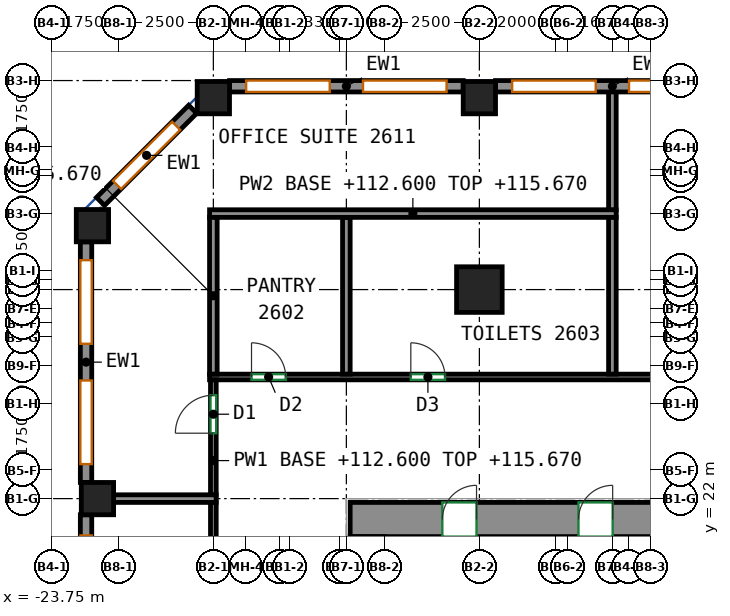
"""IFC4 building model, lengths in metres.
Left out: names, types, materials, properties, quantities, classifications, styles, units other than length and angle.
Written with IfcOpenShell. Run it as: python <this file> out.ifc"""

import sys

from ifc_helpers import new_model, si_unit, direction, frame, frame_2d, origin, origin_2d, place, context, subcontext, project, spatial, rectangle, extrude, source, transform, mapped, element, fill, save


model = new_model("IFC4")
c1 = context("Model", 3, precision=1e-05, world=origin(), true_north=direction((0.0, 1.0)))
c2 = subcontext(c1, "Body", "Model", "MODEL_VIEW")
j1 = project(units=[si_unit("LENGTHUNIT", "METRE"), si_unit("PLANEANGLEUNIT", "RADIAN")], contexts=[c1])
p1 = place(None, origin())
s1 = spatial("IfcSite", under=j1, at=p1, CompositionType="ELEMENT")
p2 = place(p1, origin())
s2 = spatial("IfcBuilding", under=s1, at=p2, CompositionType="ELEMENT")
p3 = place(p2, frame((0.0, 0.0, 112.6)))
s3 = spatial("IfcBuildingStorey", under=s2, at=p3, CompositionType="ELEMENT", Elevation=112.6)
m1 = source(origin(), c2, "Body", "SweptSolid", [
    extrude(rectangle(XDim=0.85, YDim=0.85, at=origin_2d()), origin(), (0.0, 0.0, 1.0), 3.72),
])
for number, where, z_axis, x_axis in (
    (1, (-22.682, 29.182, 0.0), (0.0, 0.0, 1.0), (1.0, 0.0, 0.0)),
    (2, (-22.55, 22.0, 0.0), (0.0, 0.0, 1.0), (1.0, 0.0, 0.0)),
    (3, (-19.5, 32.55, 0.0), (0.0, 0.0, 1.0), (1.0, 0.0, 0.0)),
):
    element("IfcColumn", number, at=place(p3, frame(where, z_axis=z_axis, x_axis=x_axis)), inside=s3, PredefinedType="COLUMN", context=c2, shape_type="MappedRepresentation", body=[
        mapped(m1, transform((0.0, 0.0, 0.0))),
    ])
m2 = source(origin(), c2, "Body", "SweptSolid", [
    extrude(rectangle(XDim=1.2, YDim=1.2, at=origin_2d()), origin(), (0.0, 0.0, 1.0), 3.72),
])
p4 = place(p3, frame((-12.5, 27.5, 0.0), z_axis=(0.0, 0.0, 1.0), x_axis=(1.0, 0.0, 0.0)))
e4 = element("IfcColumn", 4, at=p4, inside=s3, PredefinedType="COLUMN", context=c2, shape_type="MappedRepresentation", body=[
    mapped(m2, transform((0.0, 0.0, 0.0))),
])
p5 = place(p3, frame((-12.5, 32.55, 0.0), z_axis=(0.0, 0.0, 1.0), x_axis=(1.0, 0.0, 0.0)))
e5 = element("IfcColumn", 5, at=p5, inside=s3, PredefinedType="COLUMN", context=c2, shape_type="MappedRepresentation", body=[
    mapped(m1, transform((0.0, 0.0, 0.0))),
])
m3 = source(origin(), c2, "Body", "SweptSolid", [
    extrude(rectangle(XDim=33.9, YDim=0.9, at=frame_2d((16.95, 0.0))), origin(), (0.0, 0.0, 1.0), 3.72),
])
p6 = place(p3, frame((-15.9, 21.45, 0.0), z_axis=(0.0, 0.0, 1.0), x_axis=(1.0, 0.0, 0.0)))
e6 = element("IfcWall", 6, at=p6, inside=s3, PredefinedType="SHEAR", context=c2, shape_type="MappedRepresentation", body=[
    mapped(m3, transform((0.0, 0.0, 0.0))),
])
p7 = place(p6, frame((6.008, 0.0, 0.0)))
e7 = element("IfcOpeningElement", 7, at=p7, cuts=e6, PredefinedType="OPENING", context=c2, shape_type="SweptSolid", body=[
    extrude(rectangle(XDim=0.9, YDim=2.1, at=frame_2d((0.45, 1.05))), frame((0.0, 0.46, 0.0), z_axis=(0.0, -1.0, 0.0), x_axis=(1.0, 0.0, 0.0)), (0.0, 0.0, 1.0), 0.92),
])
p8 = place(p6, frame((8.688, 0.0, 0.0)))
e8 = element("IfcOpeningElement", 8, at=p8, cuts=e6, PredefinedType="OPENING", context=c2, shape_type="SweptSolid", body=[
    extrude(rectangle(XDim=0.9, YDim=2.1, at=frame_2d((0.45, 1.05))), frame((0.0, 0.46, 0.0), z_axis=(0.0, -1.0, 0.0), x_axis=(1.0, 0.0, 0.0)), (0.0, 0.0, 1.0), 0.92),
])
p9 = place(p6, frame((12.185, 0.0, 0.0)))
e9 = element("IfcOpeningElement", 9, at=p9, cuts=e6, PredefinedType="OPENING", context=c2, shape_type="SweptSolid", body=[
    extrude(rectangle(XDim=0.9, YDim=2.1, at=frame_2d((0.45, 1.05))), frame((0.0, 0.46, 0.0), z_axis=(0.0, -1.0, 0.0), x_axis=(1.0, 0.0, 0.0)), (0.0, 0.0, 1.0), 0.92),
])
p10 = place(p6, frame((16.138, 0.0, 0.0)))
e10 = element("IfcOpeningElement", 10, at=p10, cuts=e6, PredefinedType="OPENING", context=c2, shape_type="SweptSolid", body=[
    extrude(rectangle(XDim=0.9, YDim=2.1, at=frame_2d((0.45, 1.05))), frame((0.0, 0.46, 0.0), z_axis=(0.0, -1.0, 0.0), x_axis=(1.0, 0.0, 0.0)), (0.0, 0.0, 1.0), 0.92),
])
p11 = place(p6, frame((20.962, 0.0, 0.0)))
e11 = element("IfcOpeningElement", 11, at=p11, cuts=e6, PredefinedType="OPENING", context=c2, shape_type="SweptSolid", body=[
    extrude(rectangle(XDim=0.9, YDim=2.1, at=frame_2d((0.45, 1.05))), frame((0.0, 0.46, 0.0), z_axis=(0.0, -1.0, 0.0), x_axis=(1.0, 0.0, 0.0)), (0.0, 0.0, 1.0), 0.92),
])
p12 = place(p6, frame((26.389, 0.0, 0.0)))
e12 = element("IfcOpeningElement", 12, at=p12, cuts=e6, PredefinedType="OPENING", context=c2, shape_type="SweptSolid", body=[
    extrude(rectangle(XDim=0.9, YDim=2.1, at=frame_2d((0.45, 1.05))), frame((0.0, 0.46, 0.0), z_axis=(0.0, -1.0, 0.0), x_axis=(1.0, 0.0, 0.0)), (0.0, 0.0, 1.0), 0.92),
])
p13 = place(p6, frame((2.425, 0.0, 0.0)))
e13 = element("IfcOpeningElement", 13, at=p13, cuts=e6, PredefinedType="OPENING", context=c2, shape_type="SweptSolid", body=[
    extrude(rectangle(XDim=0.9, YDim=2.1, at=frame_2d((0.45, 1.05))), frame((0.0, 0.46, 0.0), z_axis=(0.0, -1.0, 0.0), x_axis=(1.0, 0.0, 0.0)), (0.0, 0.0, 1.0), 0.92),
])
p14 = place(p6, frame((30.575, 0.0, 0.0)))
e14 = element("IfcOpeningElement", 14, at=p14, cuts=e6, PredefinedType="OPENING", context=c2, shape_type="SweptSolid", body=[
    extrude(rectangle(XDim=0.9, YDim=2.1, at=frame_2d((0.45, 1.05))), frame((0.0, 0.46, 0.0), z_axis=(0.0, -1.0, 0.0), x_axis=(1.0, 0.0, 0.0)), (0.0, 0.0, 1.0), 0.92),
])
m4 = source(origin(), c2, "Body", "SweptSolid", [
    extrude(rectangle(XDim=6.15, YDim=0.3, at=frame_2d((3.075, 0.0))), origin(), (0.0, 0.0, 1.0), 3.72),
])
p15 = place(p3, frame((-5.925, 32.85, 0.0), z_axis=(0.0, 0.0, 1.0), x_axis=(-1.0, 0.0, 0.0)))
e15 = element("IfcWall", 15, at=p15, inside=s3, PredefinedType="SOLIDWALL", context=c2, shape_type="MappedRepresentation", body=[
    mapped(m4, transform((0.0, 0.0, 0.0))),
])
p16 = place(p15, frame((0.438, 0.0, 0.7)))
e16 = element("IfcOpeningElement", 16, at=p16, cuts=e15, PredefinedType="OPENING", context=c2, shape_type="SweptSolid", body=[
    extrude(rectangle(XDim=2.2, YDim=2.25, at=frame_2d((1.1, 1.125))), frame((0.0, 0.16, 0.0), z_axis=(0.0, -1.0, 0.0), x_axis=(1.0, 0.0, 0.0)), (0.0, 0.0, 1.0), 0.32),
])
p17 = place(p15, frame((3.512, 0.0, 0.7)))
e17 = element("IfcOpeningElement", 17, at=p17, cuts=e15, PredefinedType="OPENING", context=c2, shape_type="SweptSolid", body=[
    extrude(rectangle(XDim=2.2, YDim=2.25, at=frame_2d((1.1, 1.125))), frame((0.0, 0.16, 0.0), z_axis=(0.0, -1.0, 0.0), x_axis=(1.0, 0.0, 0.0)), (0.0, 0.0, 1.0), 0.32),
])
p18 = place(p3, frame((-12.925, 32.85, 0.0), z_axis=(0.0, 0.0, 1.0), x_axis=(-1.0, 0.0, 0.0)))
e18 = element("IfcWall", 18, at=p18, inside=s3, PredefinedType="SOLIDWALL", context=c2, shape_type="MappedRepresentation", body=[
    mapped(m4, transform((0.0, 0.0, 0.0))),
])
p19 = place(p18, frame((0.438, 0.0, 0.7)))
e19 = element("IfcOpeningElement", 19, at=p19, cuts=e18, PredefinedType="OPENING", context=c2, shape_type="SweptSolid", body=[
    extrude(rectangle(XDim=2.2, YDim=2.25, at=frame_2d((1.1, 1.125))), frame((0.0, 0.16, 0.0), z_axis=(0.0, -1.0, 0.0), x_axis=(1.0, 0.0, 0.0)), (0.0, 0.0, 1.0), 0.32),
])
p20 = place(p18, frame((3.512, 0.0, 0.7)))
e20 = element("IfcOpeningElement", 20, at=p20, cuts=e18, PredefinedType="OPENING", context=c2, shape_type="SweptSolid", body=[
    extrude(rectangle(XDim=2.2, YDim=2.25, at=frame_2d((1.1, 1.125))), frame((0.0, 0.16, 0.0), z_axis=(0.0, -1.0, 0.0), x_axis=(1.0, 0.0, 0.0)), (0.0, 0.0, 1.0), 0.32),
])
m5 = source(origin(), c2, "Body", "SweptSolid", [
    extrude(rectangle(XDim=3.429, YDim=0.3, at=frame_2d((1.715, 0.0))), origin(), (0.0, 0.0, 1.0), 3.72),
])
p21 = place(p3, frame((-20.044, 32.244, 0.0), z_axis=(0.0, 0.0, 1.0), x_axis=(-0.707106781187, -0.707106781187, 0.0)))
e21 = element("IfcWall", 21, at=p21, inside=s3, PredefinedType="SOLIDWALL", context=c2, shape_type="MappedRepresentation", body=[
    mapped(m5, transform((0.0, 0.0, 0.0))),
])
p22 = place(p21, frame((0.615, 0.0, 0.7)))
e22 = element("IfcOpeningElement", 22, at=p22, cuts=e21, PredefinedType="OPENING", context=c2, shape_type="SweptSolid", body=[
    extrude(rectangle(XDim=2.2, YDim=2.25, at=frame_2d((1.1, 1.125))), frame((0.0, 0.16, 0.0), z_axis=(0.0, -1.0, 0.0), x_axis=(1.0, 0.0, 0.0)), (0.0, 0.0, 1.0), 0.32),
])
m6 = source(origin(), c2, "Body", "SweptSolid", [
    extrude(rectangle(XDim=6.332, YDim=0.3, at=frame_2d((3.166, 0.0))), origin(), (0.0, 0.0, 1.0), 3.72),
])
p23 = place(p3, frame((-22.85, 28.757, 0.0), z_axis=(0.0, 0.0, 1.0), x_axis=(0.0, -1.0, 0.0)))
e23 = element("IfcWall", 23, at=p23, inside=s3, PredefinedType="SOLIDWALL", context=c2, shape_type="MappedRepresentation", body=[
    mapped(m6, transform((0.0, 0.0, 0.0))),
])
p24 = place(p23, frame((0.483, 0.0, 0.7)))
e24 = element("IfcOpeningElement", 24, at=p24, cuts=e23, PredefinedType="OPENING", context=c2, shape_type="SweptSolid", body=[
    extrude(rectangle(XDim=2.2, YDim=2.25, at=frame_2d((1.1, 1.125))), frame((0.0, 0.16, 0.0), z_axis=(0.0, -1.0, 0.0), x_axis=(1.0, 0.0, 0.0)), (0.0, 0.0, 1.0), 0.32),
])
p25 = place(p23, frame((3.649, 0.0, 0.7)))
e25 = element("IfcOpeningElement", 25, at=p25, cuts=e23, PredefinedType="OPENING", context=c2, shape_type="SweptSolid", body=[
    extrude(rectangle(XDim=2.2, YDim=2.25, at=frame_2d((1.1, 1.125))), frame((0.0, 0.16, 0.0), z_axis=(0.0, -1.0, 0.0), x_axis=(1.0, 0.0, 0.0)), (0.0, 0.0, 1.0), 0.32),
])
m7 = source(origin(), c2, "Body", "SweptSolid", [
    extrude(rectangle(XDim=13.15, YDim=0.3, at=frame_2d((6.575, 0.0))), origin(), (0.0, 0.0, 1.0), 3.72),
])
p26 = place(p3, frame((-22.85, 21.575, 0.0), z_axis=(0.0, 0.0, 1.0), x_axis=(0.0, -1.0, 0.0)))
e26 = element("IfcWall", 26, at=p26, inside=s3, PredefinedType="SOLIDWALL", context=c2, shape_type="MappedRepresentation", body=[
    mapped(m7, transform((0.0, 0.0, 0.0))),
])
p27 = place(p26, frame((0.544, 0.0, 0.7)))
e27 = element("IfcOpeningElement", 27, at=p27, cuts=e26, PredefinedType="OPENING", context=c2, shape_type="SweptSolid", body=[
    extrude(rectangle(XDim=2.2, YDim=2.25, at=frame_2d((1.1, 1.125))), frame((0.0, 0.16, 0.0), z_axis=(0.0, -1.0, 0.0), x_axis=(1.0, 0.0, 0.0)), (0.0, 0.0, 1.0), 0.32),
])
p28 = place(p26, frame((3.831, 0.0, 0.7)))
e28 = element("IfcOpeningElement", 28, at=p28, cuts=e26, PredefinedType="OPENING", context=c2, shape_type="SweptSolid", body=[
    extrude(rectangle(XDim=2.2, YDim=2.25, at=frame_2d((1.1, 1.125))), frame((0.0, 0.16, 0.0), z_axis=(0.0, -1.0, 0.0), x_axis=(1.0, 0.0, 0.0)), (0.0, 0.0, 1.0), 0.32),
])
p29 = place(p26, frame((7.119, 0.0, 0.7)))
e29 = element("IfcOpeningElement", 29, at=p29, cuts=e26, PredefinedType="OPENING", context=c2, shape_type="SweptSolid", body=[
    extrude(rectangle(XDim=2.2, YDim=2.25, at=frame_2d((1.1, 1.125))), frame((0.0, 0.16, 0.0), z_axis=(0.0, -1.0, 0.0), x_axis=(1.0, 0.0, 0.0)), (0.0, 0.0, 1.0), 0.32),
])
p30 = place(p26, frame((10.406, 0.0, 0.7)))
e30 = element("IfcOpeningElement", 30, at=p30, cuts=e26, PredefinedType="OPENING", context=c2, shape_type="SweptSolid", body=[
    extrude(rectangle(XDim=2.2, YDim=2.25, at=frame_2d((1.1, 1.125))), frame((0.0, 0.16, 0.0), z_axis=(0.0, -1.0, 0.0), x_axis=(1.0, 0.0, 0.0)), (0.0, 0.0, 1.0), 0.32),
])
p31 = place(p3, frame((-19.6, 25.2, 0.0), z_axis=(0.0, 0.0, 1.0), x_axis=(1.0, 0.0, 0.0)))
e31 = element("IfcWall", 31, at=p31, inside=s3, PredefinedType="PARTITIONING", context=c2, shape_type="SweptSolid", body=[
    extrude(rectangle(XDim=40.175, YDim=0.15, at=frame_2d((20.087, 0.0))), origin(), (0.0, 0.0, 1.0), 3.72),
])
p32 = place(p31, frame((1.104, 0.0, 0.0)))
e32 = element("IfcOpeningElement", 32, at=p32, cuts=e31, PredefinedType="OPENING", context=c2, shape_type="SweptSolid", body=[
    extrude(rectangle(XDim=0.9, YDim=2.1, at=frame_2d((0.45, 1.05))), frame((0.0, 0.085, 0.0), z_axis=(0.0, -1.0, 0.0), x_axis=(1.0, 0.0, 0.0)), (0.0, 0.0, 1.0), 0.17),
])
p33 = place(p31, frame((5.296, 0.0, 0.0)))
e33 = element("IfcOpeningElement", 33, at=p33, cuts=e31, PredefinedType="OPENING", context=c2, shape_type="SweptSolid", body=[
    extrude(rectangle(XDim=0.9, YDim=2.1, at=frame_2d((0.45, 1.05))), frame((0.0, 0.085, 0.0), z_axis=(0.0, -1.0, 0.0), x_axis=(1.0, 0.0, 0.0)), (0.0, 0.0, 1.0), 0.17),
])
p34 = place(p31, frame((18.302, 0.0, 0.0)))
e34 = element("IfcOpeningElement", 34, at=p34, cuts=e31, PredefinedType="OPENING", context=c2, shape_type="SweptSolid", body=[
    extrude(rectangle(XDim=1.0, YDim=2.1, at=frame_2d((0.5, 1.05))), frame((0.0, 0.085, 0.0), z_axis=(0.0, -1.0, 0.0), x_axis=(1.0, 0.0, 0.0)), (0.0, 0.0, 1.0), 0.17),
])
p35 = place(p31, frame((30.209, 0.0, 0.0)))
e35 = element("IfcOpeningElement", 35, at=p35, cuts=e31, PredefinedType="OPENING", context=c2, shape_type="SweptSolid", body=[
    extrude(rectangle(XDim=0.9, YDim=2.1, at=frame_2d((0.45, 1.05))), frame((0.0, 0.085, 0.0), z_axis=(0.0, -1.0, 0.0), x_axis=(1.0, 0.0, 0.0)), (0.0, 0.0, 1.0), 0.17),
])
p36 = place(p31, frame((32.702, 0.0, 0.0)))
e36 = element("IfcOpeningElement", 36, at=p36, cuts=e31, PredefinedType="OPENING", context=c2, shape_type="SweptSolid", body=[
    extrude(rectangle(XDim=1.8, YDim=2.1, at=frame_2d((0.9, 1.05))), frame((0.0, 0.085, 0.0), z_axis=(0.0, -1.0, 0.0), x_axis=(1.0, 0.0, 0.0)), (0.0, 0.0, 1.0), 0.17),
])
p37 = place(p3, frame((-19.5, 22.09, 0.0), z_axis=(0.0, 0.0, 1.0), x_axis=(0.0, 1.0, 0.0)))
e37 = element("IfcWall", 37, at=p37, inside=s3, PredefinedType="PARTITIONING", context=c2, shape_type="SweptSolid", body=[
    extrude(rectangle(XDim=3.035, YDim=0.15, at=frame_2d((1.518, 0.0))), origin(), (0.0, 0.0, 1.0), 3.07),
])
p38 = place(p37, frame((1.631, 0.0, 0.0)))
e38 = element("IfcOpeningElement", 38, at=p38, cuts=e37, PredefinedType="OPENING", context=c2, shape_type="SweptSolid", body=[
    extrude(rectangle(XDim=1.0, YDim=2.1, at=frame_2d((0.5, 1.05))), frame((0.0, 0.085, 0.0), z_axis=(0.0, -1.0, 0.0), x_axis=(1.0, 0.0, 0.0)), (0.0, 0.0, 1.0), 0.17),
])
p39 = place(p3, frame((-19.5, 8.09, 0.0), z_axis=(0.0, 0.0, 1.0), x_axis=(0.0, 1.0, 0.0)))
e39 = element("IfcWall", 39, at=p39, inside=s3, PredefinedType="PARTITIONING", context=c2, shape_type="SweptSolid", body=[
    extrude(rectangle(XDim=13.82, YDim=0.15, at=frame_2d((6.91, 0.0))), origin(), (0.0, 0.0, 1.0), 3.07),
])
p40 = place(p39, frame((9.214, 0.0, 0.0)))
e40 = element("IfcOpeningElement", 40, at=p40, cuts=e39, PredefinedType="OPENING", context=c2, shape_type="SweptSolid", body=[
    extrude(rectangle(XDim=0.9, YDim=2.1, at=frame_2d((0.45, 1.05))), frame((0.0, 0.085, 0.0), z_axis=(0.0, -1.0, 0.0), x_axis=(1.0, 0.0, 0.0)), (0.0, 0.0, 1.0), 0.17),
])
p41 = place(p3, frame((-9.0, 25.276, 0.0), z_axis=(0.0, 0.0, 1.0), x_axis=(0.0, 1.0, 0.0)))
e41 = element("IfcWall", 41, at=p41, inside=s3, PredefinedType="PARTITIONING", context=c2, shape_type="SweptSolid", body=[
    extrude(rectangle(XDim=4.134, YDim=0.2, at=frame_2d((2.067, 0.0))), origin(), (0.0, 0.0, 1.0), 3.72),
])
p42 = place(p3, frame((-9.0, 29.59, 0.0), z_axis=(0.0, 0.0, 1.0), x_axis=(0.0, 1.0, 0.0)))
e42 = element("IfcWall", 42, at=p42, inside=s3, PredefinedType="PARTITIONING", context=c2, shape_type="SweptSolid", body=[
    extrude(rectangle(XDim=3.16, YDim=0.2, at=frame_2d((1.58, 0.0))), origin(), (0.0, 0.0, 1.0), 3.72),
])
p43 = place(p3, frame((-16.0, 29.4, 0.0), z_axis=(0.0, 0.0, 1.0), x_axis=(0.0, -1.0, 0.0)))
e43 = element("IfcWall", 43, at=p43, inside=s3, PredefinedType="PARTITIONING", context=c2, shape_type="SweptSolid", body=[
    extrude(rectangle(XDim=4.124, YDim=0.2, at=frame_2d((2.062, 0.0))), origin(), (0.0, 0.0, 1.0), 3.72),
])
p44 = place(p3, frame((-19.6, 29.5, 0.0), z_axis=(0.0, 0.0, 1.0), x_axis=(1.0, 0.0, 0.0)))
e44 = element("IfcWall", 44, at=p44, inside=s3, PredefinedType="PARTITIONING", context=c2, shape_type="SweptSolid", body=[
    extrude(rectangle(XDim=10.7, YDim=0.2, at=frame_2d((5.35, 0.0))), origin(), (0.0, 0.0, 1.0), 3.07),
])
p45 = place(p3, frame((-19.5, 29.4, 0.0), z_axis=(0.0, 0.0, 1.0), x_axis=(0.0, -1.0, 0.0)))
e45 = element("IfcWall", 45, at=p45, inside=s3, PredefinedType="PARTITIONING", context=c2, shape_type="SweptSolid", body=[
    extrude(rectangle(XDim=4.124, YDim=0.2, at=frame_2d((2.062, 0.0))), origin(), (0.0, 0.0, 1.0), 3.07),
])
p46 = place(p3, frame((-22.125, 22.0, 0.0), z_axis=(0.0, 0.0, 1.0), x_axis=(1.0, 0.0, 0.0)))
e46 = element("IfcWall", 46, at=p46, inside=s3, PredefinedType="PARTITIONING", context=c2, shape_type="SweptSolid", body=[
    extrude(rectangle(XDim=2.699, YDim=0.2, at=frame_2d((1.35, 0.0))), origin(), (0.0, 0.0, 1.0), 3.72),
])
p47 = place(p16, origin())
e47 = element("IfcWindow", 47, at=p47, inside=s3, PartitioningType="SINGLE_PANEL", PredefinedType="WINDOW", context=c2, shape_type="SweptSolid", body=[
    extrude(rectangle(XDim=2.2, YDim=2.25, at=frame_2d((1.1, 1.125))), frame((0.0, 0.03, 0.0), z_axis=(0.0, -1.0, 0.0), x_axis=(1.0, 0.0, 0.0)), (0.0, 0.0, 1.0), 0.06),
])
fill(e16, e47)
p48 = place(p17, origin())
e48 = element("IfcWindow", 48, at=p48, inside=s3, PartitioningType="SINGLE_PANEL", PredefinedType="WINDOW", context=c2, shape_type="SweptSolid", body=[
    extrude(rectangle(XDim=2.2, YDim=2.25, at=frame_2d((1.1, 1.125))), frame((0.0, 0.03, 0.0), z_axis=(0.0, -1.0, 0.0), x_axis=(1.0, 0.0, 0.0)), (0.0, 0.0, 1.0), 0.06),
])
fill(e17, e48)
p49 = place(p19, origin())
e49 = element("IfcWindow", 49, at=p49, inside=s3, PartitioningType="SINGLE_PANEL", PredefinedType="WINDOW", context=c2, shape_type="SweptSolid", body=[
    extrude(rectangle(XDim=2.2, YDim=2.25, at=frame_2d((1.1, 1.125))), frame((0.0, 0.03, 0.0), z_axis=(0.0, -1.0, 0.0), x_axis=(1.0, 0.0, 0.0)), (0.0, 0.0, 1.0), 0.06),
])
fill(e19, e49)
p50 = place(p20, origin())
e50 = element("IfcWindow", 50, at=p50, inside=s3, PartitioningType="SINGLE_PANEL", PredefinedType="WINDOW", context=c2, shape_type="SweptSolid", body=[
    extrude(rectangle(XDim=2.2, YDim=2.25, at=frame_2d((1.1, 1.125))), frame((0.0, 0.03, 0.0), z_axis=(0.0, -1.0, 0.0), x_axis=(1.0, 0.0, 0.0)), (0.0, 0.0, 1.0), 0.06),
])
fill(e20, e50)
p51 = place(p22, origin())
e51 = element("IfcWindow", 51, at=p51, inside=s3, PartitioningType="SINGLE_PANEL", PredefinedType="WINDOW", context=c2, shape_type="SweptSolid", body=[
    extrude(rectangle(XDim=2.2, YDim=2.25, at=frame_2d((1.1, 1.125))), frame((0.0, 0.03, 0.0), z_axis=(0.0, -1.0, 0.0), x_axis=(1.0, 0.0, 0.0)), (0.0, 0.0, 1.0), 0.06),
])
fill(e22, e51)
p52 = place(p24, origin())
e52 = element("IfcWindow", 52, at=p52, inside=s3, PartitioningType="SINGLE_PANEL", PredefinedType="WINDOW", context=c2, shape_type="SweptSolid", body=[
    extrude(rectangle(XDim=2.2, YDim=2.25, at=frame_2d((1.1, 1.125))), frame((0.0, 0.03, 0.0), z_axis=(0.0, -1.0, 0.0), x_axis=(1.0, 0.0, 0.0)), (0.0, 0.0, 1.0), 0.06),
])
fill(e24, e52)
p53 = place(p25, origin())
e53 = element("IfcWindow", 53, at=p53, inside=s3, PartitioningType="SINGLE_PANEL", PredefinedType="WINDOW", context=c2, shape_type="SweptSolid", body=[
    extrude(rectangle(XDim=2.2, YDim=2.25, at=frame_2d((1.1, 1.125))), frame((0.0, 0.03, 0.0), z_axis=(0.0, -1.0, 0.0), x_axis=(1.0, 0.0, 0.0)), (0.0, 0.0, 1.0), 0.06),
])
fill(e25, e53)
p54 = place(p27, origin())
e54 = element("IfcWindow", 54, at=p54, inside=s3, PartitioningType="SINGLE_PANEL", PredefinedType="WINDOW", context=c2, shape_type="SweptSolid", body=[
    extrude(rectangle(XDim=2.2, YDim=2.25, at=frame_2d((1.1, 1.125))), frame((0.0, 0.03, 0.0), z_axis=(0.0, -1.0, 0.0), x_axis=(1.0, 0.0, 0.0)), (0.0, 0.0, 1.0), 0.06),
])
fill(e27, e54)
p55 = place(p7, origin())
e55 = element("IfcDoor", 55, at=p55, inside=s3, OperationType="SINGLE_SWING_RIGHT", PredefinedType="DOOR", context=c2, shape_type="SweptSolid", body=[
    extrude(rectangle(XDim=0.9, YDim=2.1, at=frame_2d((0.45, 1.05))), frame((0.0, -0.305, 0.0), z_axis=(0.0, -1.0, 0.0), x_axis=(1.0, 0.0, 0.0)), (0.0, 0.0, 1.0), 0.05),
])
fill(e7, e55)
p56 = place(p13, origin())
e56 = element("IfcDoor", 56, at=p56, inside=s3, OperationType="SINGLE_SWING_RIGHT", PredefinedType="DOOR", context=c2, shape_type="SweptSolid", body=[
    extrude(rectangle(XDim=0.9, YDim=2.1, at=frame_2d((0.45, 1.05))), frame((0.0, -0.305, 0.0), z_axis=(0.0, -1.0, 0.0), x_axis=(1.0, 0.0, 0.0)), (0.0, 0.0, 1.0), 0.05),
])
fill(e13, e56)
p57 = place(p38, origin())
e57 = element("IfcDoor", 57, at=p57, inside=s3, OperationType="SINGLE_SWING_LEFT", PredefinedType="DOOR", context=c2, shape_type="SweptSolid", body=[
    extrude(rectangle(XDim=1.0, YDim=2.1, at=frame_2d((0.5, 1.05))), frame((0.0, 0.025, 0.0), z_axis=(0.0, -1.0, 0.0), x_axis=(1.0, 0.0, 0.0)), (0.0, 0.0, 1.0), 0.05),
])
fill(e38, e57)
p58 = place(p32, origin())
e58 = element("IfcDoor", 58, at=p58, inside=s3, OperationType="SINGLE_SWING_LEFT", PredefinedType="DOOR", context=c2, shape_type="SweptSolid", body=[
    extrude(rectangle(XDim=0.9, YDim=2.1, at=frame_2d((0.45, 1.05))), frame((0.0, 0.025, 0.0), z_axis=(0.0, -1.0, 0.0), x_axis=(1.0, 0.0, 0.0)), (0.0, 0.0, 1.0), 0.05),
])
fill(e32, e58)
p59 = place(p33, origin())
e59 = element("IfcDoor", 59, at=p59, inside=s3, OperationType="SINGLE_SWING_LEFT", PredefinedType="DOOR", context=c2, shape_type="SweptSolid", body=[
    extrude(rectangle(XDim=0.9, YDim=2.1, at=frame_2d((0.45, 1.05))), frame((0.0, 0.025, 0.0), z_axis=(0.0, -1.0, 0.0), x_axis=(1.0, 0.0, 0.0)), (0.0, 0.0, 1.0), 0.05),
])
fill(e33, e59)
save(model, sys.argv[1])
